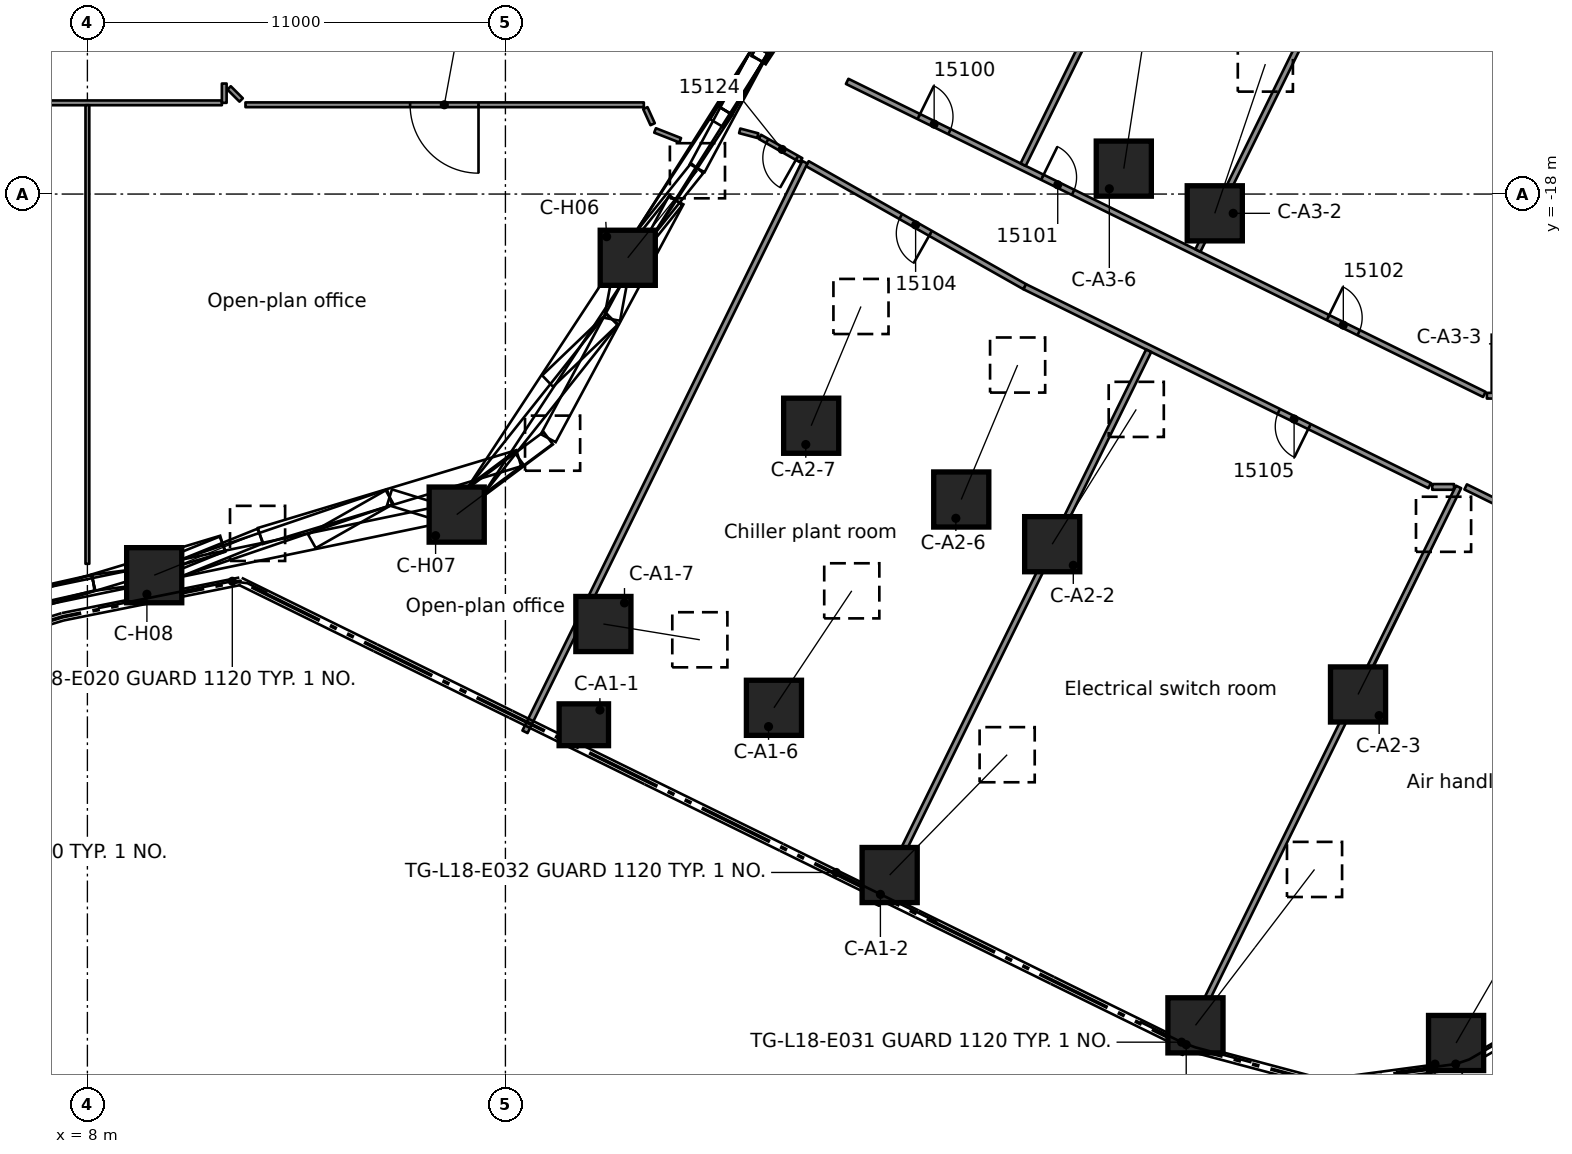
"""IFC4 building model, lengths in metres.
Left out: names, types, materials, properties, quantities, classifications, styles, units other than length and angle.
Written with IfcOpenShell. Run it as: python <this file> out.ifc"""

import sys

from ifc_helpers import new_model, si_unit, direction, frame, frame_2d, origin, origin_2d, place, context, subcontext, project, spatial, rectangle, extrude, element, fill, save


model = new_model("IFC4")
c1 = context("Model", 3, precision=1e-05, world=origin(), true_north=direction((0.0, 1.0)))
c2 = subcontext(c1, "Body", "Model", "MODEL_VIEW")
j1 = project(units=[si_unit("LENGTHUNIT", "METRE"), si_unit("PLANEANGLEUNIT", "RADIAN")], contexts=[c1])
p1 = place(None, origin())
s1 = spatial("IfcSite", under=j1, at=p1, CompositionType="ELEMENT")
p2 = place(p1, origin())
s2 = spatial("IfcBuilding", under=s1, at=p2, CompositionType="ELEMENT")
p3 = place(p2, frame((0.0, 0.0, 76.3)))
s3 = spatial("IfcBuildingStorey", under=s2, at=p3, CompositionType="ELEMENT", Elevation=76.3)
p4 = place(p3, frame((21.063, -31.964, 0.0), z_axis=(0.0, 0.0, 1.0), x_axis=(1.0, 0.0, 0.0)))
e1 = element("IfcColumn", 1, at=p4, inside=s3, PredefinedType="COLUMN", context=c2, shape_type="SweptSolid", body=[
    extrude(rectangle(XDim=1.3, YDim=1.1, at=origin_2d()), origin(), (0.0, 0.0, 1.0), 4.4),
])
p5 = place(p3, frame((29.111, -35.918, 0.586), z_axis=(0.564424202194, 0.577973235475, 0.589382947711), x_axis=(-0.715442874533, 0.698671234044, 0.0)))
e2 = element("IfcColumn", 2, at=p5, inside=s3, PredefinedType="COLUMN", context=c2, shape_type="SweptSolid", body=[
    extrude(rectangle(XDim=1.45, YDim=1.45, at=origin_2d()), origin(), (0.0, 0.0, 1.0), 5.478),
])
p6 = place(p3, frame((37.158, -39.873, 0.618), z_axis=(0.51751737923, 0.67757554787, 0.522558263856), x_axis=(-0.794713470027, 0.606984761389, 0.0)))
e3 = element("IfcColumn", 3, at=p6, inside=s3, PredefinedType="COLUMN", context=c2, shape_type="SweptSolid", body=[
    extrude(rectangle(XDim=1.45, YDim=1.45, at=origin_2d()), origin(), (0.0, 0.0, 1.0), 6.054),
])
p7 = place(p3, frame((44.016, -40.338, 0.634), z_axis=(0.437998456823, 0.757195262355, 0.484574748091), x_axis=(-0.865613473048, 0.500712807183, 0.0)))
e4 = element("IfcColumn", 4, at=p7, inside=s3, PredefinedType="COLUMN", context=c2, shape_type="SweptSolid", body=[
    extrude(rectangle(XDim=1.45, YDim=1.45, at=origin_2d()), origin(), (0.0, 0.0, 1.0), 6.463),
])
p8 = place(p3, frame((26.066, -31.518, 0.539), z_axis=(0.412094939361, 0.619345928653, 0.668272685072), x_axis=(-0.832547748734, 0.553953288716, 0.0)))
e5 = element("IfcColumn", 5, at=p8, inside=s3, PredefinedType="COLUMN", context=c2, shape_type="SweptSolid", body=[
    extrude(rectangle(XDim=1.45, YDim=1.45, at=origin_2d()), origin(), (0.0, 0.0, 1.0), 4.97),
])
p9 = place(p3, frame((21.578, -29.313, 0.425), z_axis=(0.579058536629, -0.094690218571, 0.809768469172), x_axis=(0.161380983903, 0.986892181565, 0.0)))
e6 = element("IfcColumn", 6, at=p9, inside=s3, PredefinedType="COLUMN", context=c2, shape_type="SweptSolid", body=[
    extrude(rectangle(XDim=1.45, YDim=1.45, at=origin_2d()), origin(), (0.0, 0.0, 1.0), 4.383),
])
p10 = place(p3, frame((33.388, -27.213, 0.572), z_axis=(0.417502902057, 0.669405381424, 0.614481702001), x_axis=(-0.848496661311, 0.529200732939, 0.0)))
e7 = element("IfcColumn", 7, at=p10, inside=s3, PredefinedType="COLUMN", context=c2, shape_type="SweptSolid", body=[
    extrude(rectangle(XDim=1.45, YDim=1.45, at=origin_2d()), origin(), (0.0, 0.0, 1.0), 5.299),
])
p11 = place(p3, frame((41.436, -31.167, 0.612), z_axis=(0.379249735907, 0.754795861111, 0.5352128977), x_axis=(-0.893548583897, 0.448966511241, 0.0)))
e8 = element("IfcColumn", 8, at=p11, inside=s3, PredefinedType="COLUMN", context=c2, shape_type="SweptSolid", body=[
    extrude(rectangle(XDim=1.45, YDim=1.45, at=origin_2d()), origin(), (0.0, 0.0, 1.0), 5.933),
])
p12 = place(p3, frame((30.995, -26.037, 0.55), z_axis=(0.293015861637, 0.699108637939, 0.652218381517), x_axis=(-0.922269042928, 0.386548590032, 0.0)))
e9 = element("IfcColumn", 9, at=p12, inside=s3, PredefinedType="COLUMN", context=c2, shape_type="SweptSolid", body=[
    extrude(rectangle(XDim=1.45, YDim=1.45, at=origin_2d()), origin(), (0.0, 0.0, 1.0), 5.061),
])
p13 = place(p3, frame((27.046, -24.096, 0.515), z_axis=(0.273638788717, 0.655437821725, 0.703933999152), x_axis=(-0.922806926199, 0.38526273757, 0.0)))
e10 = element("IfcColumn", 10, at=p13, inside=s3, PredefinedType="COLUMN", context=c2, shape_type="SweptSolid", body=[
    extrude(rectangle(XDim=1.45, YDim=1.45, at=origin_2d()), origin(), (0.0, 0.0, 1.0), 4.788),
])
p14 = place(p3, frame((37.666, -18.507, 0.57), z_axis=(0.252347690402, 0.744499743234, 0.618094471318), x_axis=(-0.947075588551, 0.321010637785, 0.0)))
e11 = element("IfcColumn", 11, at=p14, inside=s3, PredefinedType="COLUMN", context=c2, shape_type="SweptSolid", body=[
    extrude(rectangle(XDim=1.45, YDim=1.45, at=origin_2d()), origin(), (0.0, 0.0, 1.0), 5.275),
])
p15 = place(p3, frame((45.713, -22.461, 0.614), z_axis=(0.229855301875, 0.814814927922, 0.532205950207), x_axis=(-0.962438656011, 0.27149923281, 0.0)))
e12 = element("IfcColumn", 12, at=p15, inside=s3, PredefinedType="COLUMN", context=c2, shape_type="SweptSolid", body=[
    extrude(rectangle(XDim=1.45, YDim=1.45, at=origin_2d()), origin(), (0.0, 0.0, 1.0), 5.961),
])
p16 = place(p3, frame((35.272, -17.331, 0.558), z_axis=(0.117156658899, 0.761186259922, 0.637863461081), x_axis=(-0.988361727552, 0.152121975764, 0.0)))
e13 = element("IfcColumn", 13, at=p16, inside=s3, PredefinedType="COLUMN", context=c2, shape_type="SweptSolid", body=[
    extrude(rectangle(XDim=1.45, YDim=1.45, at=origin_2d()), origin(), (0.0, 0.0, 1.0), 5.147),
])
p17 = place(p3, frame((22.219, -19.677, 0.469), z_axis=(0.404114198636, 0.504604790097, 0.762932316967), x_axis=(-0.780543967772, 0.625100883358, 0.0)))
e14 = element("IfcColumn", 14, at=p17, inside=s3, PredefinedType="COLUMN", context=c2, shape_type="SweptSolid", body=[
    extrude(rectangle(XDim=1.45, YDim=1.45, at=origin_2d()), origin(), (0.0, 0.0, 1.0), 4.538),
])
p18 = place(p3, frame((17.718, -26.434, 0.491), z_axis=(0.5431164527, 0.404525579295, 0.735787723805), x_axis=(-0.597339433781, 0.801988529127, 0.0)))
e15 = element("IfcColumn", 15, at=p18, inside=s3, PredefinedType="COLUMN", context=c2, shape_type="SweptSolid", body=[
    extrude(rectangle(XDim=1.45, YDim=1.45, at=origin_2d()), origin(), (0.0, 0.0, 1.0), 4.645),
])
p19 = place(p3, frame((9.758, -28.029, 0.469), z_axis=(0.599329365947, 0.242399975133, 0.762919761947), x_axis=(-0.374945909979, 0.927046689542, 0.0)))
e16 = element("IfcColumn", 16, at=p19, inside=s3, PredefinedType="COLUMN", context=c2, shape_type="SweptSolid", body=[
    extrude(rectangle(XDim=1.45, YDim=1.45, at=origin_2d()), origin(), (0.0, 0.0, 1.0), 4.538),
])
p20 = place(p3, frame((22.682, -15.739, 0.0), z_axis=(0.0, 0.0, 1.0), x_axis=(0.413486242538, -0.910510366351, 0.0)))
e17 = element("IfcWall", 17, at=p20, inside=s3, PredefinedType="PARTITIONING", context=c2, shape_type="SweptSolid", body=[
    extrude(rectangle(XDim=0.465, YDim=0.125, at=frame_2d((0.232, 0.0))), origin(), (0.0, 0.0, 1.0), 3.98),
])
p21 = place(p3, frame((11.729, -15.207, 0.0), z_axis=(0.0, 0.0, 1.0), x_axis=(0.707106781187, -0.707106781187, 0.0)))
e18 = element("IfcWall", 18, at=p21, inside=s3, PredefinedType="PARTITIONING", context=c2, shape_type="SweptSolid", body=[
    extrude(rectangle(XDim=0.448, YDim=0.125, at=frame_2d((0.224, 0.0))), origin(), (0.0, 0.0, 1.0), 3.98),
])
p22 = place(p3, frame((26.782, -17.11, 0.0), z_axis=(0.0, 0.0, 1.0), x_axis=(-0.869921591707, 0.493190048847, 0.0)))
e19 = element("IfcWall", 19, at=p22, inside=s3, PredefinedType="PARTITIONING", context=c2, shape_type="SweptSolid", body=[
    extrude(rectangle(XDim=1.25, YDim=0.125, at=frame_2d((0.625, 0.0))), origin(), (0.0, 0.0, 1.0), 3.98),
])
p23 = place(p22, frame((0.125, 0.0, 0.0)))
e20 = element("IfcOpeningElement", 20, at=p23, cuts=e19, PredefinedType="OPENING", context=c2, shape_type="SweptSolid", body=[
    extrude(rectangle(XDim=0.9, YDim=2.1, at=frame_2d((0.45, 1.05))), frame((0.0, 0.073, 0.0), z_axis=(0.0, -1.0, 0.0), x_axis=(1.0, 0.0, 0.0)), (0.0, 0.0, 1.0), 0.145),
])
p24 = place(p3, frame((32.666, -20.438, 0.0), z_axis=(0.0, 0.0, 1.0), x_axis=(-0.870308211119, 0.4925074798, 0.0)))
e21 = element("IfcWall", 21, at=p24, inside=s3, PredefinedType="PARTITIONING", context=c2, shape_type="SweptSolid", body=[
    extrude(rectangle(XDim=6.575, YDim=0.15, at=frame_2d((3.287, 0.0))), origin(), (0.0, 0.0, 1.0), 3.98),
])
p25 = place(p24, frame((2.85, 0.0, 0.0)))
e22 = element("IfcOpeningElement", 22, at=p25, cuts=e21, PredefinedType="OPENING", context=c2, shape_type="SweptSolid", body=[
    extrude(rectangle(XDim=0.9, YDim=2.1, at=frame_2d((0.45, 1.05))), frame((0.0, 0.085, 0.0), z_axis=(0.0, -1.0, 0.0), x_axis=(1.0, 0.0, 0.0)), (0.0, 0.0, 1.0), 0.17),
])
p26 = place(p3, frame((43.321, -25.673, 0.0), z_axis=(0.0, 0.0, 1.0), x_axis=(-0.897519057595, 0.440975669684, 0.0)))
e23 = element("IfcWall", 23, at=p26, inside=s3, PredefinedType="PARTITIONING", context=c2, shape_type="SweptSolid", body=[
    extrude(rectangle(XDim=11.872, YDim=0.15, at=frame_2d((5.936, 0.0))), origin(), (0.0, 0.0, 1.0), 3.98),
])
p27 = place(p26, frame((3.525, 0.0, 0.0)))
e24 = element("IfcOpeningElement", 24, at=p27, cuts=e23, PredefinedType="OPENING", context=c2, shape_type="SweptSolid", body=[
    extrude(rectangle(XDim=0.9, YDim=2.1, at=frame_2d((0.45, 1.05))), frame((0.0, 0.085, 0.0), z_axis=(0.0, -1.0, 0.0), x_axis=(1.0, 0.0, 0.0)), (0.0, 0.0, 1.0), 0.17),
])
p28 = place(p3, frame((44.268, -25.706, 0.0), z_axis=(0.0, 0.0, 1.0), x_axis=(0.897495161726, -0.441024301688, 0.0)))
e25 = element("IfcWall", 25, at=p28, inside=s3, PredefinedType="PARTITIONING", context=c2, shape_type="SweptSolid", body=[
    extrude(rectangle(XDim=5.358, YDim=0.15, at=frame_2d((2.679, 0.0))), origin(), (0.0, 0.0, 1.0), 3.98),
])
p29 = place(p3, frame((27.993, -15.035, 0.0), z_axis=(0.0, 0.0, 1.0), x_axis=(0.897531550108, -0.440950242728, 0.0)))
e26 = element("IfcWall", 26, at=p29, inside=s3, PredefinedType="PARTITIONING", context=c2, shape_type="SweptSolid", body=[
    extrude(rectangle(XDim=18.68, YDim=0.15, at=frame_2d((9.34, 0.0))), origin(), (0.0, 0.0, 1.0), 3.98),
])
p30 = place(p29, frame((2.1, 0.0, 0.0)))
e27 = element("IfcOpeningElement", 27, at=p30, cuts=e26, PredefinedType="OPENING", context=c2, shape_type="SweptSolid", body=[
    extrude(rectangle(XDim=0.9, YDim=2.1, at=frame_2d((0.45, 1.05))), frame((0.0, 0.085, 0.0), z_axis=(0.0, -1.0, 0.0), x_axis=(1.0, 0.0, 0.0)), (0.0, 0.0, 1.0), 0.17),
])
p31 = place(p29, frame((5.723, 0.0, 0.0)))
e28 = element("IfcOpeningElement", 28, at=p31, cuts=e26, PredefinedType="OPENING", context=c2, shape_type="SweptSolid", body=[
    extrude(rectangle(XDim=0.9, YDim=2.1, at=frame_2d((0.45, 1.05))), frame((0.0, 0.085, 0.0), z_axis=(0.0, -1.0, 0.0), x_axis=(1.0, 0.0, 0.0)), (0.0, 0.0, 1.0), 0.17),
])
p32 = place(p29, frame((14.096, 0.0, 0.0)))
e29 = element("IfcOpeningElement", 29, at=p32, cuts=e26, PredefinedType="OPENING", context=c2, shape_type="SweptSolid", body=[
    extrude(rectangle(XDim=0.9, YDim=2.1, at=frame_2d((0.45, 1.05))), frame((0.0, 0.085, 0.0), z_axis=(0.0, -1.0, 0.0), x_axis=(1.0, 0.0, 0.0)), (0.0, 0.0, 1.0), 0.17),
])
p33 = place(p3, frame((22.938, -16.326, 0.0), z_axis=(0.0, 0.0, 1.0), x_axis=(0.931085434085, -0.36480119851, 0.0)))
e30 = element("IfcWall", 30, at=p33, inside=s3, PredefinedType="PARTITIONING", context=c2, shape_type="SweptSolid", body=[
    extrude(rectangle(XDim=0.71, YDim=0.125, at=frame_2d((0.355, 0.0))), origin(), (0.0, 0.0, 1.0), 3.98),
])
p34 = place(p3, frame((25.165, -16.337, 0.0), z_axis=(0.0, 0.0, 1.0), x_axis=(0.966726866197, -0.255810801517, 0.0)))
e31 = element("IfcWall", 31, at=p34, inside=s3, PredefinedType="PARTITIONING", context=c2, shape_type="SweptSolid", body=[
    extrude(rectangle(XDim=0.492, YDim=0.125, at=frame_2d((0.246, 0.0))), origin(), (0.0, 0.0, 1.0), 3.98),
])
p35 = place(p3, frame((43.389, -25.706, 0.0), z_axis=(0.0, 0.0, 1.0), x_axis=(1.0, 0.0, 0.0)))
e32 = element("IfcWall", 32, at=p35, inside=s3, PredefinedType="PARTITIONING", context=c2, shape_type="SweptSolid", body=[
    extrude(rectangle(XDim=0.573, YDim=0.15, at=frame_2d((0.287, 0.0))), origin(), (0.0, 0.0, 1.0), 3.98),
])
p36 = place(p3, frame((44.826, -23.306, 0.0), z_axis=(0.0, 0.0, 1.0), x_axis=(1.0, 0.0, 0.0)))
e33 = element("IfcWall", 33, at=p36, inside=s3, PredefinedType="PARTITIONING", context=c2, shape_type="SweptSolid", body=[
    extrude(rectangle(XDim=1.99, YDim=0.15, at=frame_2d((0.995, 0.0))), origin(), (0.0, 0.0, 1.0), 3.98),
])
p37 = place(p3, frame((22.642, -15.651, 0.0), z_axis=(0.0, 0.0, 1.0), x_axis=(-1.0, 0.0, 0.0)))
e34 = element("IfcWall", 34, at=p37, inside=s3, PredefinedType="PARTITIONING", context=c2, shape_type="SweptSolid", body=[
    extrude(rectangle(XDim=10.482, YDim=0.125, at=frame_2d((5.241, 0.0))), origin(), (0.0, 0.0, 1.0), 3.98),
])
p38 = place(p37, frame((4.35, 0.0, 0.0)))
e35 = element("IfcOpeningElement", 35, at=p38, cuts=e34, PredefinedType="OPENING", context=c2, shape_type="SweptSolid", body=[
    extrude(rectangle(XDim=1.8, YDim=2.1, at=frame_2d((0.9, 1.05))), frame((0.0, 0.073, 0.0), z_axis=(0.0, -1.0, 0.0), x_axis=(1.0, 0.0, 0.0)), (0.0, 0.0, 1.0), 0.145),
])
p39 = place(p3, frame((4.412, -15.6, 0.0), z_axis=(0.0, 0.0, 1.0), x_axis=(1.0, 0.0, 0.0)))
e36 = element("IfcWall", 36, at=p39, inside=s3, PredefinedType="PARTITIONING", context=c2, shape_type="SweptSolid", body=[
    extrude(rectangle(XDim=7.127, YDim=0.125, at=frame_2d((3.563, 0.0))), origin(), (0.0, 0.0, 1.0), 3.98),
])
p40 = place(p3, frame((36.754, -40.62, 0.0), z_axis=(0.0, 0.0, 1.0), x_axis=(0.440996903933, 0.897508624316, 0.0)))
e37 = element("IfcWall", 37, at=p40, inside=s3, PredefinedType="PARTITIONING", context=c2, shape_type="SweptSolid", body=[
    extrude(rectangle(XDim=16.617, YDim=0.15, at=frame_2d((8.309, 0.0))), origin(), (0.0, 0.0, 1.0), 3.98),
])
p41 = place(p3, frame((28.766, -36.695, 0.0), z_axis=(0.0, 0.0, 1.0), x_axis=(0.440989524677, 0.897512250125, 0.0)))
e38 = element("IfcWall", 38, at=p41, inside=s3, PredefinedType="PARTITIONING", context=c2, shape_type="SweptSolid", body=[
    extrude(rectangle(XDim=16.236, YDim=0.15, at=frame_2d((8.118, 0.0))), origin(), (0.0, 0.0, 1.0), 3.98),
])
p42 = place(p3, frame((37.222, -19.486, 0.0), z_axis=(0.0, 0.0, 1.0), x_axis=(0.440971293859, 0.897521207545, 0.0)))
e39 = element("IfcWall", 39, at=p42, inside=s3, PredefinedType="PARTITIONING", context=c2, shape_type="SweptSolid", body=[
    extrude(rectangle(XDim=25.592, YDim=0.15, at=frame_2d((12.796, 0.0))), origin(), (0.0, 0.0, 1.0), 3.98),
])
p43 = place(p3, frame((32.624, -17.227, 0.0), z_axis=(0.0, 0.0, 1.0), x_axis=(0.440938270509, 0.897537431866, 0.0)))
e40 = element("IfcWall", 40, at=p43, inside=s3, PredefinedType="PARTITIONING", context=c2, shape_type="SweptSolid", body=[
    extrude(rectangle(XDim=25.083, YDim=0.15, at=frame_2d((12.542, 0.0))), origin(), (0.0, 0.0, 1.0), 3.98),
])
p44 = place(p3, frame((19.515, -32.15, 0.0), z_axis=(0.0, 0.0, 1.0), x_axis=(0.44100368403, 0.897505292838, 0.0)))
e41 = element("IfcWall", 41, at=p44, inside=s3, PredefinedType="PARTITIONING", context=c2, shape_type="SweptSolid", body=[
    extrude(rectangle(XDim=16.698, YDim=0.15, at=frame_2d((8.349, 0.0))), origin(), (0.0, 0.0, 1.0), 3.98),
])
p45 = place(p3, frame((11.601, -15.6, 0.0), z_axis=(0.0, 0.0, 1.0), x_axis=(0.0, 1.0, 0.0)))
e42 = element("IfcWall", 42, at=p45, inside=s3, PredefinedType="PARTITIONING", context=c2, shape_type="SweptSolid", body=[
    extrude(rectangle(XDim=0.508, YDim=0.125, at=frame_2d((0.254, 0.0))), origin(), (0.0, 0.0, 1.0), 3.98),
])
p46 = place(p3, frame((8.0, -27.729, 0.0), z_axis=(0.0, 0.0, 1.0), x_axis=(0.0, 1.0, 0.0)))
e43 = element("IfcWall", 43, at=p46, inside=s3, PredefinedType="PARTITIONING", context=c2, shape_type="SweptSolid", body=[
    extrude(rectangle(XDim=12.067, YDim=0.1, at=frame_2d((6.033, 0.0))), origin(), (0.0, 0.0, 1.0), 3.98),
])
p47 = place(p30, origin())
e44 = element("IfcDoor", 44, at=p47, inside=s3, OperationType="SINGLE_SWING_LEFT", PredefinedType="DOOR", context=c2, shape_type="SweptSolid", body=[
    extrude(rectangle(XDim=0.9, YDim=2.1, at=frame_2d((0.45, 1.05))), frame((0.0, 0.025, 0.0), z_axis=(0.0, -1.0, 0.0), x_axis=(1.0, 0.0, 0.0)), (0.0, 0.0, 1.0), 0.05),
])
fill(e27, e44)
p48 = place(p31, origin())
e45 = element("IfcDoor", 45, at=p48, inside=s3, OperationType="SINGLE_SWING_LEFT", PredefinedType="DOOR", context=c2, shape_type="SweptSolid", body=[
    extrude(rectangle(XDim=0.9, YDim=2.1, at=frame_2d((0.45, 1.05))), frame((0.0, 0.025, 0.0), z_axis=(0.0, -1.0, 0.0), x_axis=(1.0, 0.0, 0.0)), (0.0, 0.0, 1.0), 0.05),
])
fill(e28, e45)
p49 = place(p32, origin())
e46 = element("IfcDoor", 46, at=p49, inside=s3, OperationType="SINGLE_SWING_RIGHT", PredefinedType="DOOR", context=c2, shape_type="SweptSolid", body=[
    extrude(rectangle(XDim=0.9, YDim=2.1, at=frame_2d((0.45, 1.05))), frame((0.0, 0.025, 0.0), z_axis=(0.0, -1.0, 0.0), x_axis=(1.0, 0.0, 0.0)), (0.0, 0.0, 1.0), 0.05),
])
fill(e29, e46)
p50 = place(p25, origin())
e47 = element("IfcDoor", 47, at=p50, inside=s3, OperationType="SINGLE_SWING_RIGHT", PredefinedType="DOOR", context=c2, shape_type="SweptSolid", body=[
    extrude(rectangle(XDim=0.9, YDim=2.1, at=frame_2d((0.45, 1.05))), frame((0.0, 0.025, 0.0), z_axis=(0.0, -1.0, 0.0), x_axis=(1.0, 0.0, 0.0)), (0.0, 0.0, 1.0), 0.05),
])
fill(e22, e47)
p51 = place(p27, origin())
e48 = element("IfcDoor", 48, at=p51, inside=s3, OperationType="SINGLE_SWING_LEFT", PredefinedType="DOOR", context=c2, shape_type="SweptSolid", body=[
    extrude(rectangle(XDim=0.9, YDim=2.1, at=frame_2d((0.45, 1.05))), frame((0.0, 0.025, 0.0), z_axis=(0.0, -1.0, 0.0), x_axis=(1.0, 0.0, 0.0)), (0.0, 0.0, 1.0), 0.05),
])
fill(e24, e48)
p52 = place(p38, origin())
e49 = element("IfcDoor", 49, at=p52, inside=s3, OperationType="DOUBLE_DOOR_SINGLE_SWING", PredefinedType="DOOR", context=c2, shape_type="SweptSolid", body=[
    extrude(rectangle(XDim=1.8, YDim=2.1, at=frame_2d((0.9, 1.05))), frame((0.0, 0.025, 0.0), z_axis=(0.0, -1.0, 0.0), x_axis=(1.0, 0.0, 0.0)), (0.0, 0.0, 1.0), 0.05),
])
fill(e35, e49)
p53 = place(p23, origin())
e50 = element("IfcDoor", 50, at=p53, inside=s3, OperationType="SINGLE_SWING_LEFT", PredefinedType="DOOR", context=c2, shape_type="SweptSolid", body=[
    extrude(rectangle(XDim=0.9, YDim=2.1, at=frame_2d((0.45, 1.05))), frame((0.0, 0.025, 0.0), z_axis=(0.0, -1.0, 0.0), x_axis=(1.0, 0.0, 0.0)), (0.0, 0.0, 1.0), 0.05),
])
fill(e20, e50)
save(model, sys.argv[1])
